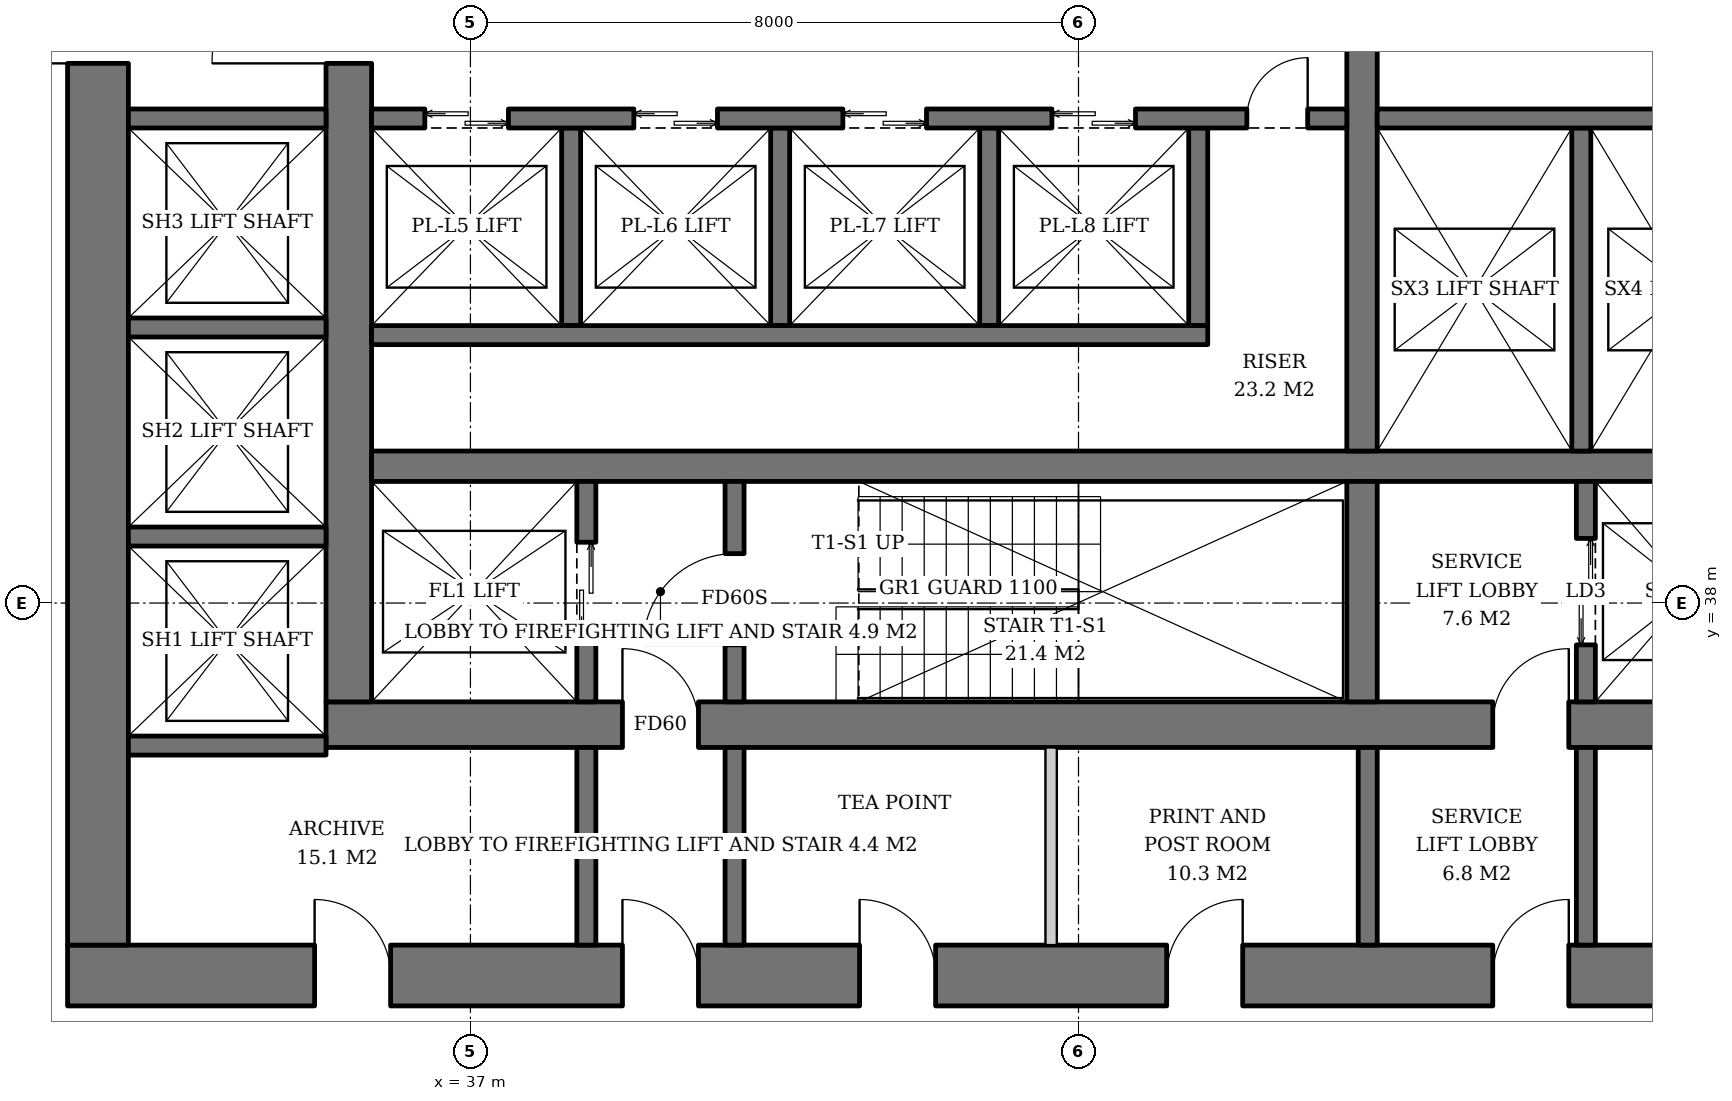
"""IFC4 building model, lengths in metres.
Left out: names, types, materials, properties, quantities, classifications, styles, units other than length and angle.
Written with IfcOpenShell. Run it as: python <this file> out.ifc"""

import sys

from ifc_helpers import new_model, si_unit, direction, frame, frame_2d, origin, place, context, subcontext, project, spatial, rectangle, extrude, element, fill, save


model = new_model("IFC4")
c1 = context("Model", 3, precision=1e-05, world=origin(), true_north=direction((0.0, 1.0)))
c2 = subcontext(c1, "Body", "Model", "MODEL_VIEW")
j1 = project(units=[si_unit("LENGTHUNIT", "METRE"), si_unit("PLANEANGLEUNIT", "RADIAN")], contexts=[c1])
p1 = place(None, origin())
s1 = spatial("IfcSite", under=j1, at=p1, CompositionType="ELEMENT")
p2 = place(p1, origin())
s2 = spatial("IfcBuilding", under=s1, at=p2, CompositionType="ELEMENT")
p3 = place(p2, frame((0.0, 0.0, 43.8)))
s3 = spatial("IfcBuildingStorey", under=s2, at=p3, CompositionType="ELEMENT", Elevation=43.8)
p4 = place(p3, frame((35.1, 36.4, 0.0), z_axis=(0.0, 0.0, 1.0), x_axis=(1.0, 0.0, 0.0)))
e1 = element("IfcWall", 1, at=p4, inside=s3, PredefinedType="SHEAR", context=c2, shape_type="SweptSolid", body=[
    extrude(rectangle(XDim=19.8, YDim=0.6, at=frame_2d((9.9, 0.0))), origin(), (0.0, 0.0, 1.0), 3.8),
])
p5 = place(p4, frame((3.9, 0.0, 0.0)))
e2 = element("IfcOpeningElement", 2, at=p5, cuts=e1, PredefinedType="OPENING", context=c2, shape_type="SweptSolid", body=[
    extrude(rectangle(XDim=1.0, YDim=2.1, at=frame_2d((0.5, 1.05))), frame((0.0, 0.31, 0.0), z_axis=(0.0, -1.0, 0.0), x_axis=(1.0, 0.0, 0.0)), (0.0, 0.0, 1.0), 0.62),
])
p6 = place(p4, frame((15.35, 0.0, 0.0)))
e3 = element("IfcOpeningElement", 3, at=p6, cuts=e1, PredefinedType="OPENING", context=c2, shape_type="SweptSolid", body=[
    extrude(rectangle(XDim=1.0, YDim=2.1, at=frame_2d((0.5, 1.05))), frame((0.0, 0.31, 0.0), z_axis=(0.0, -1.0, 0.0), x_axis=(1.0, 0.0, 0.0)), (0.0, 0.0, 1.0), 0.62),
])
p7 = place(p3, frame((35.4, 36.7, 0.0), z_axis=(0.0, 0.0, 1.0), x_axis=(0.0, 1.0, 0.0)))
e4 = element("IfcWall", 4, at=p7, inside=s3, PredefinedType="SHEAR", context=c2, shape_type="SweptSolid", body=[
    extrude(rectangle(XDim=18.6, YDim=0.6, at=frame_2d((9.3, 0.0))), origin(), (0.0, 0.0, 1.0), 3.8),
])
p8 = place(p7, frame((8.4, 0.0, 0.0)))
e5 = element("IfcOpeningElement", 5, at=p8, cuts=e4, PredefinedType="OPENING", context=c2, shape_type="SweptSolid", body=[
    extrude(rectangle(XDim=1.8, YDim=2.4, at=frame_2d((0.9, 1.2))), frame((0.0, 0.31, 0.0), z_axis=(0.0, -1.0, 0.0), x_axis=(1.0, 0.0, 0.0)), (0.0, 0.0, 1.0), 0.62),
])
p9 = place(p3, frame((31.7, 33.1, 0.0), z_axis=(0.0, 0.0, 1.0), x_axis=(1.0, 0.0, 0.0)))
e6 = element("IfcWall", 6, at=p9, inside=s3, PredefinedType="SHEAR", context=c2, shape_type="SweptSolid", body=[
    extrude(rectangle(XDim=26.6, YDim=0.8, at=frame_2d((13.3, 0.0))), origin(), (0.0, 0.0, 1.0), 3.8),
])
p10 = place(p9, frame((7.3, 0.0, 0.0)))
e7 = element("IfcOpeningElement", 7, at=p10, cuts=e6, PredefinedType="OPENING", context=c2, shape_type="SweptSolid", body=[
    extrude(rectangle(XDim=1.0, YDim=2.1, at=frame_2d((0.5, 1.05))), frame((0.0, 0.41, 0.0), z_axis=(0.0, -1.0, 0.0), x_axis=(1.0, 0.0, 0.0)), (0.0, 0.0, 1.0), 0.82),
])
p11 = place(p9, frame((18.75, 0.0, 0.0)))
e8 = element("IfcOpeningElement", 8, at=p11, cuts=e6, PredefinedType="OPENING", context=c2, shape_type="SweptSolid", body=[
    extrude(rectangle(XDim=1.0, YDim=2.1, at=frame_2d((0.5, 1.05))), frame((0.0, 0.41, 0.0), z_axis=(0.0, -1.0, 0.0), x_axis=(1.0, 0.0, 0.0)), (0.0, 0.0, 1.0), 0.82),
])
p12 = place(p9, frame((3.25, 0.0, 0.0)))
e9 = element("IfcOpeningElement", 9, at=p12, cuts=e6, PredefinedType="OPENING", context=c2, shape_type="SweptSolid", body=[
    extrude(rectangle(XDim=1.0, YDim=2.1, at=frame_2d((0.5, 1.05))), frame((0.0, 0.41, 0.0), z_axis=(0.0, -1.0, 0.0), x_axis=(1.0, 0.0, 0.0)), (0.0, 0.0, 1.0), 0.82),
])
p13 = place(p9, frame((10.42, 0.0, 0.0)))
e10 = element("IfcOpeningElement", 10, at=p13, cuts=e6, PredefinedType="OPENING", context=c2, shape_type="SweptSolid", body=[
    extrude(rectangle(XDim=1.0, YDim=2.1, at=frame_2d((0.5, 1.05))), frame((0.0, 0.41, 0.0), z_axis=(0.0, -1.0, 0.0), x_axis=(1.0, 0.0, 0.0)), (0.0, 0.0, 1.0), 0.82),
])
p14 = place(p9, frame((14.46, 0.0, 0.0)))
e11 = element("IfcOpeningElement", 11, at=p14, cuts=e6, PredefinedType="OPENING", context=c2, shape_type="SweptSolid", body=[
    extrude(rectangle(XDim=1.0, YDim=2.1, at=frame_2d((0.5, 1.05))), frame((0.0, 0.41, 0.0), z_axis=(0.0, -1.0, 0.0), x_axis=(1.0, 0.0, 0.0)), (0.0, 0.0, 1.0), 0.82),
])
p15 = place(p9, frame((22.45, 0.0, 0.0)))
e12 = element("IfcOpeningElement", 12, at=p15, cuts=e6, PredefinedType="OPENING", context=c2, shape_type="SweptSolid", body=[
    extrude(rectangle(XDim=1.0, YDim=2.1, at=frame_2d((0.5, 1.05))), frame((0.0, 0.41, 0.0), z_axis=(0.0, -1.0, 0.0), x_axis=(1.0, 0.0, 0.0)), (0.0, 0.0, 1.0), 0.82),
])
p16 = place(p3, frame((32.1, 33.5, 0.0), z_axis=(0.0, 0.0, 1.0), x_axis=(0.0, 1.0, 0.0)))
e13 = element("IfcWall", 13, at=p16, inside=s3, PredefinedType="SHEAR", context=c2, shape_type="SweptSolid", body=[
    extrude(rectangle(XDim=25.0, YDim=0.8, at=frame_2d((12.5, 0.0))), origin(), (0.0, 0.0, 1.0), 3.8),
])
p17 = place(p16, frame((11.6, 0.0, 0.0)))
e14 = element("IfcOpeningElement", 14, at=p17, cuts=e13, PredefinedType="OPENING", context=c2, shape_type="SweptSolid", body=[
    extrude(rectangle(XDim=1.8, YDim=2.4, at=frame_2d((0.9, 1.2))), frame((0.0, 0.41, 0.0), z_axis=(0.0, -1.0, 0.0), x_axis=(1.0, 0.0, 0.0)), (0.0, 0.0, 1.0), 0.82),
])
p18 = place(p3, frame((35.7, 39.8, 0.0), z_axis=(0.0, 0.0, 1.0), x_axis=(1.0, 0.0, 0.0)))
e15 = element("IfcWall", 15, at=p18, inside=s3, PredefinedType="SHEAR", context=c2, shape_type="SweptSolid", body=[
    extrude(rectangle(XDim=18.6, YDim=0.4, at=frame_2d((9.3, 0.0))), origin(), (0.0, 0.0, 1.0), 3.8),
])
p19 = place(p3, frame((48.73, 36.7, 0.0), z_axis=(0.0, 0.0, 1.0), x_axis=(0.0, 1.0, 0.0)))
e16 = element("IfcWall", 16, at=p19, inside=s3, PredefinedType="SHEAR", context=c2, shape_type="SweptSolid", body=[
    extrude(rectangle(XDim=2.9, YDim=0.4, at=frame_2d((1.45, 0.0))), origin(), (0.0, 0.0, 1.0), 3.8),
])
p20 = place(p3, frame((48.73, 40.0, 0.0), z_axis=(0.0, 0.0, 1.0), x_axis=(0.0, 1.0, 0.0)))
e17 = element("IfcWall", 17, at=p20, inside=s3, PredefinedType="SHEAR", context=c2, shape_type="SweptSolid", body=[
    extrude(rectangle(XDim=12.0, YDim=0.4, at=frame_2d((6.0, 0.0))), origin(), (0.0, 0.0, 1.0), 3.8),
])
p21 = place(p3, frame((38.525, 36.7, 0.0), z_axis=(0.0, 0.0, 1.0), x_axis=(0.0, 1.0, 0.0)))
e18 = element("IfcWall", 18, at=p21, inside=s3, PredefinedType="SHEAR", context=c2, shape_type="SweptSolid", body=[
    extrude(rectangle(XDim=2.9, YDim=0.25, at=frame_2d((1.45, 0.0))), origin(), (0.0, 0.0, 1.0), 3.8),
])
p22 = place(p21, frame((0.8, 0.0, 0.0)))
e19 = element("IfcOpeningElement", 19, at=p22, cuts=e18, PredefinedType="OPENING", context=c2, shape_type="SweptSolid", body=[
    extrude(rectangle(XDim=1.3, YDim=2.2, at=frame_2d((0.65, 1.1))), frame((0.0, 0.135, 0.0), z_axis=(0.0, -1.0, 0.0), x_axis=(1.0, 0.0, 0.0)), (0.0, 0.0, 1.0), 0.27),
])
p23 = place(p3, frame((40.475, 36.7, 0.0), z_axis=(0.0, 0.0, 1.0), x_axis=(0.0, 1.0, 0.0)))
e20 = element("IfcWall", 20, at=p23, inside=s3, PredefinedType="SHEAR", context=c2, shape_type="SweptSolid", body=[
    extrude(rectangle(XDim=2.9, YDim=0.25, at=frame_2d((1.45, 0.0))), origin(), (0.0, 0.0, 1.0), 3.8),
])
p24 = place(p23, frame((0.75, 0.0, 0.0)))
e21 = element("IfcOpeningElement", 21, at=p24, cuts=e20, PredefinedType="OPENING", context=c2, shape_type="SweptSolid", body=[
    extrude(rectangle(XDim=1.2, YDim=2.1, at=frame_2d((0.6, 1.05))), frame((0.0, 0.135, 0.0), z_axis=(0.0, -1.0, 0.0), x_axis=(1.0, 0.0, 0.0)), (0.0, 0.0, 1.0), 0.27),
])
p25 = place(p3, frame((51.675, 36.7, 0.0), z_axis=(0.0, 0.0, 1.0), x_axis=(0.0, 1.0, 0.0)))
e22 = element("IfcWall", 22, at=p25, inside=s3, PredefinedType="SHEAR", context=c2, shape_type="SweptSolid", body=[
    extrude(rectangle(XDim=2.9, YDim=0.25, at=frame_2d((1.45, 0.0))), origin(), (0.0, 0.0, 1.0), 3.8),
])
p26 = place(p25, frame((0.75, 0.0, 0.0)))
e23 = element("IfcOpeningElement", 23, at=p26, cuts=e22, PredefinedType="OPENING", context=c2, shape_type="SweptSolid", body=[
    extrude(rectangle(XDim=1.4, YDim=2.4, at=frame_2d((0.7, 1.2))), frame((0.0, 0.135, 0.0), z_axis=(0.0, -1.0, 0.0), x_axis=(1.0, 0.0, 0.0)), (0.0, 0.0, 1.0), 0.27),
])
for number, where, z_axis, x_axis in (
    (24, (38.325, 44.25, 0.0), (0.0, 0.0, 1.0), (0.0, -1.0, 0.0)),
    (25, (41.075, 44.25, 0.0), (0.0, 0.0, 1.0), (0.0, -1.0, 0.0)),
    (26, (43.825, 44.25, 0.0), (0.0, 0.0, 1.0), (0.0, -1.0, 0.0)),
    (27, (46.575, 44.25, 0.0), (0.0, 0.0, 1.0), (0.0, -1.0, 0.0)),
):
    element("IfcWall", number, at=place(p3, frame(where, z_axis=z_axis, x_axis=x_axis)), inside=s3, PredefinedType="SHEAR", context=c2, shape_type="SweptSolid", body=[
        extrude(rectangle(XDim=2.6, YDim=0.25, at=frame_2d((1.3, 0.0))), origin(), (0.0, 0.0, 1.0), 3.8),
    ])
p27 = place(p3, frame((35.7, 41.525, 0.0), z_axis=(0.0, 0.0, 1.0), x_axis=(1.0, 0.0, 0.0)))
e28 = element("IfcWall", 28, at=p27, inside=s3, PredefinedType="SHEAR", context=c2, shape_type="SweptSolid", body=[
    extrude(rectangle(XDim=11.0, YDim=0.25, at=frame_2d((5.5, 0.0))), origin(), (0.0, 0.0, 1.0), 3.8),
])
p28 = place(p3, frame((35.7, 44.375, 0.0), z_axis=(0.0, 0.0, 1.0), x_axis=(1.0, 0.0, 0.0)))
e29 = element("IfcWall", 29, at=p28, inside=s3, PredefinedType="SHEAR", context=c2, shape_type="SweptSolid", body=[
    extrude(rectangle(XDim=12.83, YDim=0.25, at=frame_2d((6.415, 0.0))), origin(), (0.0, 0.0, 1.0), 3.8),
])
p29 = place(p28, frame((0.7, 0.0, 0.0)))
e30 = element("IfcOpeningElement", 30, at=p29, cuts=e29, PredefinedType="OPENING", context=c2, shape_type="SweptSolid", body=[
    extrude(rectangle(XDim=1.1, YDim=2.2, at=frame_2d((0.55, 1.1))), frame((0.0, 0.135, 0.0), z_axis=(0.0, -1.0, 0.0), x_axis=(1.0, 0.0, 0.0)), (0.0, 0.0, 1.0), 0.27),
])
p30 = place(p28, frame((3.45, 0.0, 0.0)))
e31 = element("IfcOpeningElement", 31, at=p30, cuts=e29, PredefinedType="OPENING", context=c2, shape_type="SweptSolid", body=[
    extrude(rectangle(XDim=1.1, YDim=2.2, at=frame_2d((0.55, 1.1))), frame((0.0, 0.135, 0.0), z_axis=(0.0, -1.0, 0.0), x_axis=(1.0, 0.0, 0.0)), (0.0, 0.0, 1.0), 0.27),
])
p31 = place(p28, frame((6.2, 0.0, 0.0)))
e32 = element("IfcOpeningElement", 32, at=p31, cuts=e29, PredefinedType="OPENING", context=c2, shape_type="SweptSolid", body=[
    extrude(rectangle(XDim=1.1, YDim=2.2, at=frame_2d((0.55, 1.1))), frame((0.0, 0.135, 0.0), z_axis=(0.0, -1.0, 0.0), x_axis=(1.0, 0.0, 0.0)), (0.0, 0.0, 1.0), 0.27),
])
p32 = place(p28, frame((8.95, 0.0, 0.0)))
e33 = element("IfcOpeningElement", 33, at=p32, cuts=e29, PredefinedType="OPENING", context=c2, shape_type="SweptSolid", body=[
    extrude(rectangle(XDim=1.1, YDim=2.2, at=frame_2d((0.55, 1.1))), frame((0.0, 0.135, 0.0), z_axis=(0.0, -1.0, 0.0), x_axis=(1.0, 0.0, 0.0)), (0.0, 0.0, 1.0), 0.27),
])
p33 = place(p28, frame((11.515, 0.0, 0.0)))
e34 = element("IfcOpeningElement", 34, at=p33, cuts=e29, PredefinedType="OPENING", context=c2, shape_type="SweptSolid", body=[
    extrude(rectangle(XDim=0.8, YDim=2.0, at=frame_2d((0.4, 1.0))), frame((0.0, 0.135, 0.0), z_axis=(0.0, -1.0, 0.0), x_axis=(1.0, 0.0, 0.0)), (0.0, 0.0, 1.0), 0.27),
])
p34 = place(p3, frame((51.615, 44.25, 0.0), z_axis=(0.0, 0.0, 1.0), x_axis=(0.0, -1.0, 0.0)))
e35 = element("IfcWall", 35, at=p34, inside=s3, PredefinedType="SHEAR", context=c2, shape_type="SweptSolid", body=[
    extrude(rectangle(XDim=4.25, YDim=0.25, at=frame_2d((2.125, 0.0))), origin(), (0.0, 0.0, 1.0), 3.8),
])
p35 = place(p3, frame((48.93, 44.375, 0.0), z_axis=(0.0, 0.0, 1.0), x_axis=(1.0, 0.0, 0.0)))
e36 = element("IfcWall", 36, at=p35, inside=s3, PredefinedType="SHEAR", context=c2, shape_type="SweptSolid", body=[
    extrude(rectangle(XDim=5.37, YDim=0.25, at=frame_2d((2.685, 0.0))), origin(), (0.0, 0.0, 1.0), 3.8),
])
for number, where, z_axis, x_axis in (
    (37, (32.5, 36.125, 0.0), (0.0, 0.0, 1.0), (1.0, 0.0, 0.0)),
    (38, (32.5, 38.875, 0.0), (0.0, 0.0, 1.0), (1.0, 0.0, 0.0)),
    (39, (32.5, 41.625, 0.0), (0.0, 0.0, 1.0), (1.0, 0.0, 0.0)),
    (40, (32.5, 44.375, 0.0), (0.0, 0.0, 1.0), (1.0, 0.0, 0.0)),
):
    element("IfcWall", number, at=place(p3, frame(where, z_axis=z_axis, x_axis=x_axis)), inside=s3, PredefinedType="SHEAR", context=c2, shape_type="SweptSolid", body=[
        extrude(rectangle(XDim=2.6, YDim=0.25, at=frame_2d((1.3, 0.0))), origin(), (0.0, 0.0, 1.0), 3.8),
    ])
for number, where, z_axis, x_axis in (
    (41, (38.525, 33.5, 0.0), (0.0, 0.0, 1.0), (0.0, 1.0, 0.0)),
    (42, (40.475, 33.5, 0.0), (0.0, 0.0, 1.0), (0.0, 1.0, 0.0)),
    (43, (48.805, 33.5, 0.0), (0.0, 0.0, 1.0), (0.0, 1.0, 0.0)),
    (44, (51.675, 33.5, 0.0), (0.0, 0.0, 1.0), (0.0, 1.0, 0.0)),
):
    element("IfcWall", number, at=place(p3, frame(where, z_axis=z_axis, x_axis=x_axis)), inside=s3, PredefinedType="SOLIDWALL", context=c2, shape_type="SweptSolid", body=[
        extrude(rectangle(XDim=2.6, YDim=0.25, at=frame_2d((1.3, 0.0))), origin(), (0.0, 0.0, 1.0), 3.62),
    ])
p36 = place(p3, frame((44.64, 33.5, 0.0), z_axis=(0.0, 0.0, 1.0), x_axis=(0.0, 1.0, 0.0)))
e45 = element("IfcWall", 45, at=p36, inside=s3, PredefinedType="SOLIDWALL", context=c2, shape_type="SweptSolid", body=[
    extrude(rectangle(XDim=2.6, YDim=0.15, at=frame_2d((1.3, 0.0))), origin(), (0.0, 0.0, 1.0), 3.62),
])
p37 = place(p22, origin())
e46 = element("IfcDoor", 46, at=p37, inside=s3, OperationType="DOUBLE_DOOR_SLIDING", PredefinedType="DOOR", context=c2, shape_type="SweptSolid", body=[
    extrude(rectangle(XDim=1.3, YDim=2.2, at=frame_2d((0.65, 1.1))), frame((0.0, 0.025, 0.0), z_axis=(0.0, -1.0, 0.0), x_axis=(1.0, 0.0, 0.0)), (0.0, 0.0, 1.0), 0.05),
])
fill(e19, e46)
p38 = place(p24, origin())
e47 = element("IfcDoor", 47, at=p38, inside=s3, OperationType="SINGLE_SWING_LEFT", PredefinedType="DOOR", context=c2, shape_type="SweptSolid", body=[
    extrude(rectangle(XDim=1.2, YDim=2.1, at=frame_2d((0.6, 1.05))), frame((0.0, 0.025, 0.0), z_axis=(0.0, -1.0, 0.0), x_axis=(1.0, 0.0, 0.0)), (0.0, 0.0, 1.0), 0.05),
])
fill(e21, e47)
p39 = place(p26, origin())
e48 = element("IfcDoor", 48, at=p39, inside=s3, OperationType="DOUBLE_DOOR_SLIDING", PredefinedType="DOOR", context=c2, shape_type="SweptSolid", body=[
    extrude(rectangle(XDim=1.4, YDim=2.4, at=frame_2d((0.7, 1.2))), frame((0.0, 0.025, 0.0), z_axis=(0.0, -1.0, 0.0), x_axis=(1.0, 0.0, 0.0)), (0.0, 0.0, 1.0), 0.05),
])
fill(e23, e48)
p40 = place(p29, origin())
e49 = element("IfcDoor", 49, at=p40, inside=s3, OperationType="DOUBLE_DOOR_SLIDING", PredefinedType="DOOR", context=c2, shape_type="SweptSolid", body=[
    extrude(rectangle(XDim=1.1, YDim=2.2, at=frame_2d((0.55, 1.1))), frame((0.0, 0.025, 0.0), z_axis=(0.0, -1.0, 0.0), x_axis=(1.0, 0.0, 0.0)), (0.0, 0.0, 1.0), 0.05),
])
fill(e30, e49)
p41 = place(p30, origin())
e50 = element("IfcDoor", 50, at=p41, inside=s3, OperationType="DOUBLE_DOOR_SLIDING", PredefinedType="DOOR", context=c2, shape_type="SweptSolid", body=[
    extrude(rectangle(XDim=1.1, YDim=2.2, at=frame_2d((0.55, 1.1))), frame((0.0, 0.025, 0.0), z_axis=(0.0, -1.0, 0.0), x_axis=(1.0, 0.0, 0.0)), (0.0, 0.0, 1.0), 0.05),
])
fill(e31, e50)
p42 = place(p31, origin())
e51 = element("IfcDoor", 51, at=p42, inside=s3, OperationType="DOUBLE_DOOR_SLIDING", PredefinedType="DOOR", context=c2, shape_type="SweptSolid", body=[
    extrude(rectangle(XDim=1.1, YDim=2.2, at=frame_2d((0.55, 1.1))), frame((0.0, 0.025, 0.0), z_axis=(0.0, -1.0, 0.0), x_axis=(1.0, 0.0, 0.0)), (0.0, 0.0, 1.0), 0.05),
])
fill(e32, e51)
p43 = place(p32, origin())
e52 = element("IfcDoor", 52, at=p43, inside=s3, OperationType="DOUBLE_DOOR_SLIDING", PredefinedType="DOOR", context=c2, shape_type="SweptSolid", body=[
    extrude(rectangle(XDim=1.1, YDim=2.2, at=frame_2d((0.55, 1.1))), frame((0.0, 0.025, 0.0), z_axis=(0.0, -1.0, 0.0), x_axis=(1.0, 0.0, 0.0)), (0.0, 0.0, 1.0), 0.05),
])
fill(e33, e52)
p44 = place(p33, origin())
e53 = element("IfcDoor", 53, at=p44, inside=s3, OperationType="SINGLE_SWING_RIGHT", PredefinedType="DOOR", context=c2, shape_type="SweptSolid", body=[
    extrude(rectangle(XDim=0.8, YDim=2.0, at=frame_2d((0.4, 1.0))), frame((0.0, 0.025, 0.0), z_axis=(0.0, -1.0, 0.0), x_axis=(1.0, 0.0, 0.0)), (0.0, 0.0, 1.0), 0.05),
])
fill(e34, e53)
p45 = place(p5, origin())
e54 = element("IfcDoor", 54, at=p45, inside=s3, OperationType="SINGLE_SWING_LEFT", PredefinedType="DOOR", context=c2, shape_type="SweptSolid", body=[
    extrude(rectangle(XDim=1.0, YDim=2.1, at=frame_2d((0.5, 1.05))), frame((0.0, 0.025, 0.0), z_axis=(0.0, -1.0, 0.0), x_axis=(1.0, 0.0, 0.0)), (0.0, 0.0, 1.0), 0.05),
])
fill(e2, e54)
p46 = place(p8, origin())
e55 = element("IfcDoor", 55, at=p46, inside=s3, OperationType="DOUBLE_DOOR_SINGLE_SWING", PredefinedType="DOOR", context=c2, shape_type="SweptSolid", body=[
    extrude(rectangle(XDim=1.8, YDim=2.4, at=frame_2d((0.9, 1.2))), frame((0.0, 0.025, 0.0), z_axis=(0.0, -1.0, 0.0), x_axis=(1.0, 0.0, 0.0)), (0.0, 0.0, 1.0), 0.05),
])
fill(e5, e55)
p47 = place(p6, origin())
e56 = element("IfcDoor", 56, at=p47, inside=s3, OperationType="SINGLE_SWING_RIGHT", PredefinedType="DOOR", context=c2, shape_type="SweptSolid", body=[
    extrude(rectangle(XDim=1.0, YDim=2.1, at=frame_2d((0.5, 1.05))), frame((0.0, 0.025, 0.0), z_axis=(0.0, -1.0, 0.0), x_axis=(1.0, 0.0, 0.0)), (0.0, 0.0, 1.0), 0.05),
])
fill(e3, e56)
p48 = place(p17, origin())
e57 = element("IfcDoor", 57, at=p48, inside=s3, OperationType="DOUBLE_DOOR_SINGLE_SWING", PredefinedType="DOOR", context=c2, shape_type="SweptSolid", body=[
    extrude(rectangle(XDim=1.8, YDim=2.4, at=frame_2d((0.9, 1.2))), frame((0.0, 0.025, 0.0), z_axis=(0.0, -1.0, 0.0), x_axis=(1.0, 0.0, 0.0)), (0.0, 0.0, 1.0), 0.05),
])
fill(e14, e57)
p49 = place(p10, origin())
e58 = element("IfcDoor", 58, at=p49, inside=s3, OperationType="SINGLE_SWING_LEFT", PredefinedType="DOOR", context=c2, shape_type="SweptSolid", body=[
    extrude(rectangle(XDim=1.0, YDim=2.1, at=frame_2d((0.5, 1.05))), frame((0.0, 0.025, 0.0), z_axis=(0.0, -1.0, 0.0), x_axis=(1.0, 0.0, 0.0)), (0.0, 0.0, 1.0), 0.05),
])
fill(e7, e58)
p50 = place(p11, origin())
e59 = element("IfcDoor", 59, at=p50, inside=s3, OperationType="SINGLE_SWING_RIGHT", PredefinedType="DOOR", context=c2, shape_type="SweptSolid", body=[
    extrude(rectangle(XDim=1.0, YDim=2.1, at=frame_2d((0.5, 1.05))), frame((0.0, 0.025, 0.0), z_axis=(0.0, -1.0, 0.0), x_axis=(1.0, 0.0, 0.0)), (0.0, 0.0, 1.0), 0.05),
])
fill(e8, e59)
p51 = place(p12, origin())
e60 = element("IfcDoor", 60, at=p51, inside=s3, OperationType="SINGLE_SWING_LEFT", PredefinedType="DOOR", context=c2, shape_type="SweptSolid", body=[
    extrude(rectangle(XDim=1.0, YDim=2.1, at=frame_2d((0.5, 1.05))), frame((0.0, 0.39, 0.0), z_axis=(0.0, -1.0, 0.0), x_axis=(1.0, 0.0, 0.0)), (0.0, 0.0, 1.0), 0.05),
])
fill(e9, e60)
p52 = place(p13, origin())
e61 = element("IfcDoor", 61, at=p52, inside=s3, OperationType="SINGLE_SWING_LEFT", PredefinedType="DOOR", context=c2, shape_type="SweptSolid", body=[
    extrude(rectangle(XDim=1.0, YDim=2.1, at=frame_2d((0.5, 1.05))), frame((0.0, 0.39, 0.0), z_axis=(0.0, -1.0, 0.0), x_axis=(1.0, 0.0, 0.0)), (0.0, 0.0, 1.0), 0.05),
])
fill(e10, e61)
p53 = place(p14, origin())
e62 = element("IfcDoor", 62, at=p53, inside=s3, OperationType="SINGLE_SWING_RIGHT", PredefinedType="DOOR", context=c2, shape_type="SweptSolid", body=[
    extrude(rectangle(XDim=1.0, YDim=2.1, at=frame_2d((0.5, 1.05))), frame((0.0, 0.39, 0.0), z_axis=(0.0, -1.0, 0.0), x_axis=(1.0, 0.0, 0.0)), (0.0, 0.0, 1.0), 0.05),
])
fill(e11, e62)
save(model, sys.argv[1])
